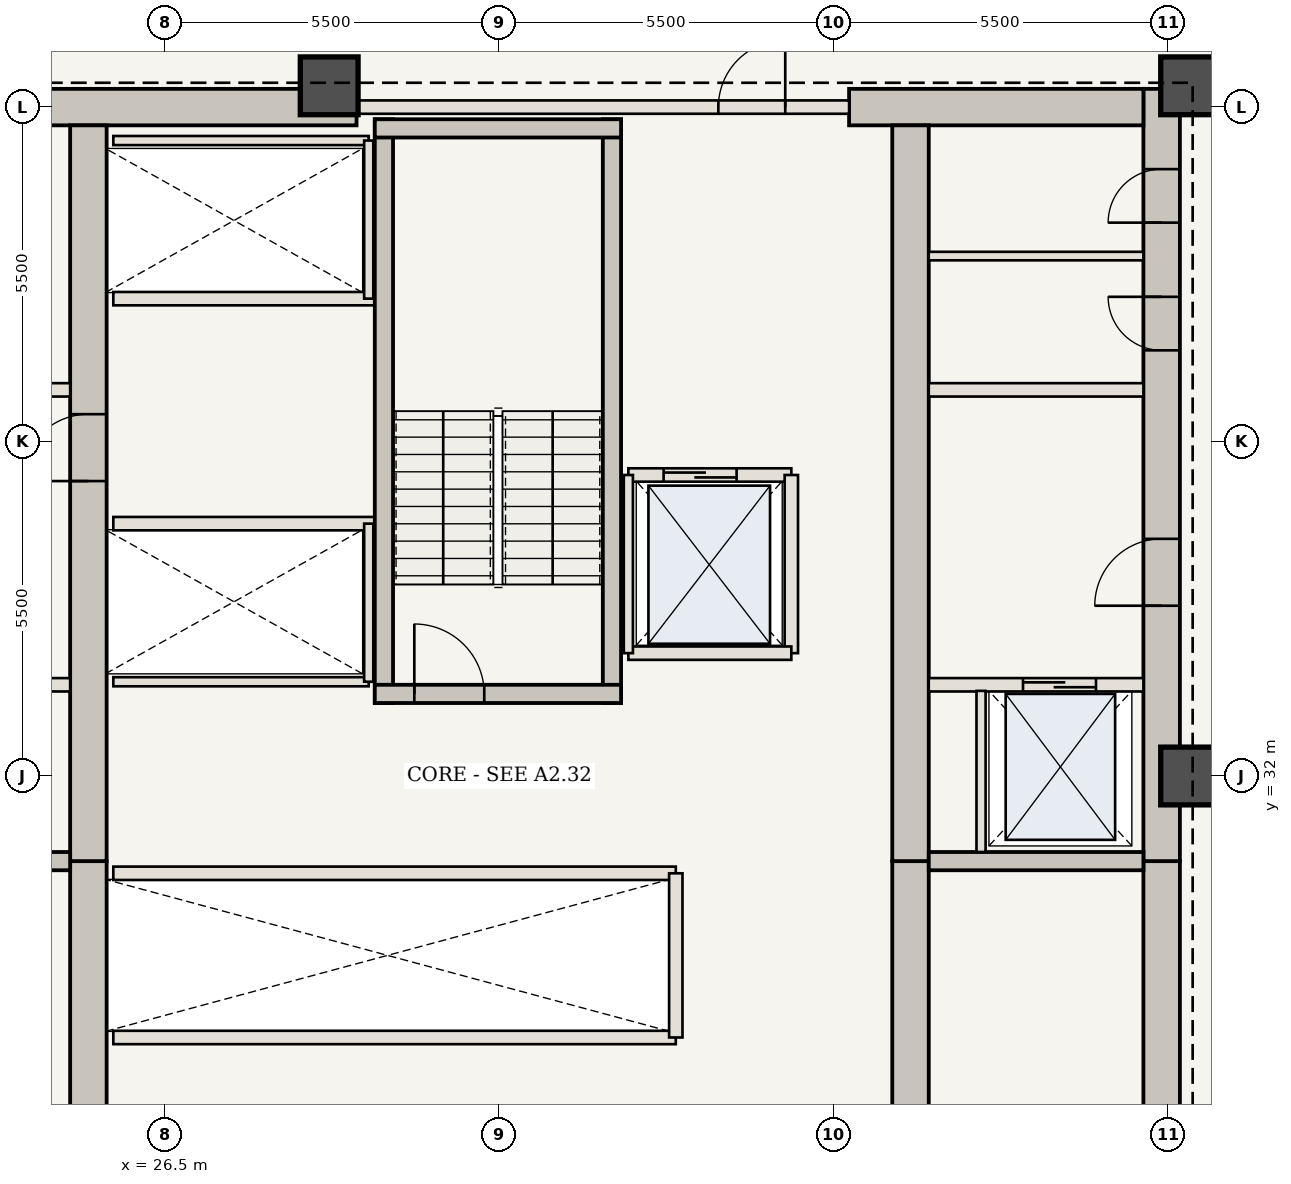
"""IFC4 building model, lengths in metres.
Left out: names, types, materials, properties, quantities, classifications, styles, units other than length and angle.
Written with IfcOpenShell. Run it as: python <this file> out.ifc"""

import sys

from ifc_helpers import new_model, si_unit, direction, frame, frame_2d, origin, origin_2d, place, context, subcontext, project, spatial, rectangle, extrude, element, fill, save


model = new_model("IFC4")
c1 = context("Model", 3, precision=1e-05, world=origin(), true_north=direction((0.0, 1.0)))
c2 = subcontext(c1, "Body", "Model", "MODEL_VIEW")
j1 = project(units=[si_unit("LENGTHUNIT", "METRE"), si_unit("PLANEANGLEUNIT", "RADIAN")], contexts=[c1])
p1 = place(None, origin())
s1 = spatial("IfcSite", under=j1, at=p1, CompositionType="ELEMENT")
p2 = place(p1, origin())
s2 = spatial("IfcBuilding", under=s1, at=p2, CompositionType="ELEMENT")
p3 = place(p2, frame((0.0, 0.0, 137.55)))
s3 = spatial("IfcBuildingStorey", under=s2, at=p3, CompositionType="ELEMENT", Elevation=137.55)
p4 = place(p3, frame((42.89, 20.65, 0.0), z_axis=(0.0, 0.0, 1.0), x_axis=(0.0, 1.0, 0.0)))
e1 = element("IfcWall", 1, at=p4, inside=s3, PredefinedType="SHEAR", context=c2, shape_type="SweptSolid", body=[
    extrude(rectangle(XDim=9.95, YDim=0.6, at=frame_2d((4.975, 0.0))), origin(), (0.0, 0.0, 1.0), 3.85),
])
p5 = place(p4, frame((1.1, 0.0, 0.0)))
e2 = element("IfcOpeningElement", 2, at=p5, cuts=e1, PredefinedType="OPENING", context=c2, shape_type="SweptSolid", body=[
    extrude(rectangle(XDim=1.15, YDim=2.15, at=frame_2d((0.575, 1.075))), frame((0.0, 0.31, 0.0), z_axis=(0.0, -1.0, 0.0), x_axis=(1.0, 0.0, 0.0)), (0.0, 0.0, 1.0), 0.62),
])
p6 = place(p3, frame((42.89, 30.6, 0.0), z_axis=(0.0, 0.0, 1.0), x_axis=(0.0, 1.0, 0.0)))
e3 = element("IfcWall", 3, at=p6, inside=s3, PredefinedType="SHEAR", context=c2, shape_type="SweptSolid", body=[
    extrude(rectangle(XDim=12.7, YDim=0.6, at=frame_2d((6.35, 0.0))), origin(), (0.0, 0.0, 1.0), 3.85),
])
p7 = place(p6, frame((4.2, 0.0, 0.0)))
e4 = element("IfcOpeningElement", 4, at=p7, cuts=e3, PredefinedType="OPENING", context=c2, shape_type="SweptSolid", body=[
    extrude(rectangle(XDim=1.1, YDim=2.15, at=frame_2d((0.55, 1.075))), frame((0.0, 0.31, 0.0), z_axis=(0.0, -1.0, 0.0), x_axis=(1.0, 0.0, 0.0)), (0.0, 0.0, 1.0), 0.62),
])
p8 = place(p6, frame((8.4, 0.0, 0.0)))
e5 = element("IfcOpeningElement", 5, at=p8, cuts=e3, PredefinedType="OPENING", context=c2, shape_type="SweptSolid", body=[
    extrude(rectangle(XDim=0.88, YDim=2.1, at=frame_2d((0.44, 1.05))), frame((0.0, 0.31, 0.0), z_axis=(0.0, -1.0, 0.0), x_axis=(1.0, 0.0, 0.0)), (0.0, 0.0, 1.0), 0.62),
])
p9 = place(p6, frame((10.5, 0.0, 0.0)))
e6 = element("IfcOpeningElement", 6, at=p9, cuts=e3, PredefinedType="OPENING", context=c2, shape_type="SweptSolid", body=[
    extrude(rectangle(XDim=0.88, YDim=2.1, at=frame_2d((0.44, 1.05))), frame((0.0, 0.31, 0.0), z_axis=(0.0, -1.0, 0.0), x_axis=(1.0, 0.0, 0.0)), (0.0, 0.0, 1.0), 0.62),
])
p10 = place(p3, frame((21.41, 43.0, 0.0), z_axis=(0.0, 0.0, 1.0), x_axis=(1.0, 0.0, 0.0)))
e7 = element("IfcWall", 7, at=p10, inside=s3, PredefinedType="SHEAR", context=c2, shape_type="SweptSolid", body=[
    extrude(rectangle(XDim=8.24, YDim=0.6, at=frame_2d((4.12, 0.0))), origin(), (0.0, 0.0, 1.0), 3.85),
])
p11 = place(p3, frame((37.75, 43.0, 0.0), z_axis=(0.0, 0.0, 1.0), x_axis=(1.0, 0.0, 0.0)))
e8 = element("IfcWall", 8, at=p11, inside=s3, PredefinedType="SHEAR", context=c2, shape_type="SweptSolid", body=[
    extrude(rectangle(XDim=4.84, YDim=0.6, at=frame_2d((2.42, 0.0))), origin(), (0.0, 0.0, 1.0), 3.85),
])
p12 = place(p3, frame((25.24, 21.25, 0.0), z_axis=(0.0, 0.0, 1.0), x_axis=(0.0, 1.0, 0.0)))
e9 = element("IfcWall", 9, at=p12, inside=s3, PredefinedType="SHEAR", context=c2, shape_type="SweptSolid", body=[
    extrude(rectangle(XDim=9.35, YDim=0.6, at=frame_2d((4.675, 0.0))), origin(), (0.0, 0.0, 1.0), 3.85),
])
p13 = place(p3, frame((25.24, 30.6, 0.0), z_axis=(0.0, 0.0, 1.0), x_axis=(0.0, 1.0, 0.0)))
e10 = element("IfcWall", 10, at=p13, inside=s3, PredefinedType="SHEAR", context=c2, shape_type="SweptSolid", body=[
    extrude(rectangle(XDim=12.1, YDim=0.6, at=frame_2d((6.05, 0.0))), origin(), (0.0, 0.0, 1.0), 3.85),
])
p14 = place(p13, frame((6.25, 0.0, 0.0)))
e11 = element("IfcOpeningElement", 11, at=p14, cuts=e10, PredefinedType="OPENING", context=c2, shape_type="SweptSolid", body=[
    extrude(rectangle(XDim=1.1, YDim=2.15, at=frame_2d((0.55, 1.075))), frame((0.0, 0.31, 0.0), z_axis=(0.0, -1.0, 0.0), x_axis=(1.0, 0.0, 0.0)), (0.0, 0.0, 1.0), 0.62),
])
p15 = place(p3, frame((38.76, 21.25, 0.0), z_axis=(0.0, 0.0, 1.0), x_axis=(0.0, 1.0, 0.0)))
e12 = element("IfcWall", 12, at=p15, inside=s3, PredefinedType="SHEAR", context=c2, shape_type="SweptSolid", body=[
    extrude(rectangle(XDim=9.35, YDim=0.6, at=frame_2d((4.675, 0.0))), origin(), (0.0, 0.0, 1.0), 3.85),
])
p16 = place(p3, frame((38.76, 30.6, 0.0), z_axis=(0.0, 0.0, 1.0), x_axis=(0.0, 1.0, 0.0)))
e13 = element("IfcWall", 13, at=p16, inside=s3, PredefinedType="SHEAR", context=c2, shape_type="SweptSolid", body=[
    extrude(rectangle(XDim=12.1, YDim=0.6, at=frame_2d((6.05, 0.0))), origin(), (0.0, 0.0, 1.0), 3.85),
])
for number, where, z_axis, x_axis in (
    (14, (43.35, 32.0, 0.0), (0.0, 0.0, 1.0), (1.0, 0.0, 0.0)),
    (15, (43.35, 43.35, 0.0), (0.0, 0.0, 1.0), (1.0, 0.0, 0.0)),
    (16, (29.2, 43.35, 0.0), (0.0, 0.0, 1.0), (1.0, 0.0, 0.0)),
):
    element("IfcColumn", number, at=place(p3, frame(where, z_axis=z_axis, x_axis=x_axis)), inside=s3, PredefinedType="COLUMN", context=c2, shape_type="SweptSolid", body=[
        extrude(rectangle(XDim=0.95, YDim=0.95, at=origin_2d()), origin(), (0.0, 0.0, 1.0), 3.85),
    ])
for number, where, z_axis, x_axis in (
    (17, (21.41, 30.6, 0.0), (0.0, 0.0, 1.0), (1.0, 0.0, 0.0)),
    (18, (39.06, 30.6, 0.0), (0.0, 0.0, 1.0), (1.0, 0.0, 0.0)),
):
    element("IfcWall", number, at=place(p3, frame(where, z_axis=z_axis, x_axis=x_axis)), inside=s3, PredefinedType="SHEAR", context=c2, shape_type="SweptSolid", body=[
        extrude(rectangle(XDim=3.53, YDim=0.3, at=frame_2d((1.765, 0.0))), origin(), (0.0, 0.0, 1.0), 3.685),
    ])
p17 = place(p3, frame((21.41, 33.5, 0.0), z_axis=(0.0, 0.0, 1.0), x_axis=(1.0, 0.0, 0.0)))
e19 = element("IfcWall", 19, at=p17, inside=s3, PredefinedType="STANDARD", context=c2, shape_type="SweptSolid", body=[
    extrude(rectangle(XDim=3.53, YDim=0.22, at=frame_2d((1.765, 0.0))), origin(), (0.0, 0.0, 1.0), 3.685),
])
p18 = place(p17, frame((0.75, 0.0, 0.0)))
e20 = element("IfcOpeningElement", 20, at=p18, cuts=e19, PredefinedType="OPENING", context=c2, shape_type="SweptSolid", body=[
    extrude(rectangle(XDim=1.2, YDim=2.2, at=frame_2d((0.6, 1.1))), frame((0.0, 0.12, 0.0), z_axis=(0.0, -1.0, 0.0), x_axis=(1.0, 0.0, 0.0)), (0.0, 0.0, 1.0), 0.24),
])
p19 = place(p3, frame((39.06, 33.5, 0.0), z_axis=(0.0, 0.0, 1.0), x_axis=(1.0, 0.0, 0.0)))
e21 = element("IfcWall", 21, at=p19, inside=s3, PredefinedType="STANDARD", context=c2, shape_type="SweptSolid", body=[
    extrude(rectangle(XDim=3.53, YDim=0.22, at=frame_2d((1.765, 0.0))), origin(), (0.0, 0.0, 1.0), 3.685),
])
p20 = place(p19, frame((1.55, 0.0, 0.0)))
e22 = element("IfcOpeningElement", 22, at=p20, cuts=e21, PredefinedType="OPENING", context=c2, shape_type="SweptSolid", body=[
    extrude(rectangle(XDim=1.2, YDim=2.2, at=frame_2d((0.6, 1.1))), frame((0.0, 0.12, 0.0), z_axis=(0.0, -1.0, 0.0), x_axis=(1.0, 0.0, 0.0)), (0.0, 0.0, 1.0), 0.24),
])
p21 = place(p3, frame((39.92, 30.75, 0.0), z_axis=(0.0, 0.0, 1.0), x_axis=(0.0, 1.0, 0.0)))
e23 = element("IfcWall", 23, at=p21, inside=s3, PredefinedType="STANDARD", context=c2, shape_type="SweptSolid", body=[
    extrude(rectangle(XDim=2.65, YDim=0.15, at=frame_2d((1.325, 0.0))), origin(), (0.0, 0.0, 1.0), 3.685),
])
for number, where, z_axis, x_axis in (
    (24, (21.41, 38.35, 0.0), (0.0, 0.0, 1.0), (1.0, 0.0, 0.0)),
    (25, (39.06, 38.35, 0.0), (0.0, 0.0, 1.0), (1.0, 0.0, 0.0)),
):
    element("IfcWall", number, at=place(p3, frame(where, z_axis=z_axis, x_axis=x_axis)), inside=s3, PredefinedType="STANDARD", context=c2, shape_type="SweptSolid", body=[
        extrude(rectangle(XDim=3.53, YDim=0.22, at=frame_2d((1.765, 0.0))), origin(), (0.0, 0.0, 1.0), 3.685),
    ])
p22 = place(p3, frame((39.06, 40.55, 0.0), z_axis=(0.0, 0.0, 1.0), x_axis=(1.0, 0.0, 0.0)))
e26 = element("IfcWall", 26, at=p22, inside=s3, PredefinedType="STANDARD", context=c2, shape_type="SweptSolid", body=[
    extrude(rectangle(XDim=3.53, YDim=0.14, at=frame_2d((1.765, 0.0))), origin(), (0.0, 0.0, 1.0), 3.685),
])
for number, where, z_axis, x_axis in (
    (27, (25.65, 27.7, 0.0), (0.0, 0.0, 1.0), (1.0, 0.0, 0.0)),
    (28, (25.65, 30.4, 0.0), (0.0, 0.0, 1.0), (1.0, 0.0, 0.0)),
):
    element("IfcWall", number, at=place(p3, frame(where, z_axis=z_axis, x_axis=x_axis)), inside=s3, PredefinedType="STANDARD", context=c2, shape_type="SweptSolid", body=[
        extrude(rectangle(XDim=9.25, YDim=0.22, at=frame_2d((4.625, 0.0))), origin(), (0.0, 0.0, 1.0), 3.685),
    ])
p23 = place(p3, frame((34.9, 27.7, 0.0), z_axis=(0.0, 0.0, 1.0), x_axis=(0.0, 1.0, 0.0)))
e29 = element("IfcWall", 29, at=p23, inside=s3, PredefinedType="STANDARD", context=c2, shape_type="SweptSolid", body=[
    extrude(rectangle(XDim=2.7, YDim=0.22, at=frame_2d((1.35, 0.0))), origin(), (0.0, 0.0, 1.0), 3.685),
])
p24 = place(p3, frame((25.65, 36.15, 0.0), z_axis=(0.0, 0.0, 1.0), x_axis=(1.0, 0.0, 0.0)))
e30 = element("IfcWall", 30, at=p24, inside=s3, PredefinedType="STANDARD", context=c2, shape_type="SweptSolid", body=[
    extrude(rectangle(XDim=4.3, YDim=0.22, at=frame_2d((2.15, 0.0))), origin(), (0.0, 0.0, 1.0), 3.685),
])
p25 = place(p3, frame((25.65, 33.55, 0.0), z_axis=(0.0, 0.0, 1.0), x_axis=(1.0, 0.0, 0.0)))
e31 = element("IfcWall", 31, at=p25, inside=s3, PredefinedType="STANDARD", context=c2, shape_type="SweptSolid", body=[
    extrude(rectangle(XDim=4.2, YDim=0.15, at=frame_2d((2.1, 0.0))), origin(), (0.0, 0.0, 1.0), 3.685),
])
p26 = place(p3, frame((29.85, 33.55, 0.0), z_axis=(0.0, 0.0, 1.0), x_axis=(0.0, 1.0, 0.0)))
e32 = element("IfcWall", 32, at=p26, inside=s3, PredefinedType="STANDARD", context=c2, shape_type="SweptSolid", body=[
    extrude(rectangle(XDim=2.6, YDim=0.15, at=frame_2d((1.3, 0.0))), origin(), (0.0, 0.0, 1.0), 3.685),
])
p27 = place(p3, frame((25.65, 39.85, 0.0), z_axis=(0.0, 0.0, 1.0), x_axis=(1.0, 0.0, 0.0)))
e33 = element("IfcWall", 33, at=p27, inside=s3, PredefinedType="STANDARD", context=c2, shape_type="SweptSolid", body=[
    extrude(rectangle(XDim=4.3, YDim=0.22, at=frame_2d((2.15, 0.0))), origin(), (0.0, 0.0, 1.0), 3.685),
])
p28 = place(p3, frame((25.65, 42.45, 0.0), z_axis=(0.0, 0.0, 1.0), x_axis=(1.0, 0.0, 0.0)))
e34 = element("IfcWall", 34, at=p28, inside=s3, PredefinedType="STANDARD", context=c2, shape_type="SweptSolid", body=[
    extrude(rectangle(XDim=4.2, YDim=0.15, at=frame_2d((2.1, 0.0))), origin(), (0.0, 0.0, 1.0), 3.685),
])
p29 = place(p3, frame((29.85, 39.85, 0.0), z_axis=(0.0, 0.0, 1.0), x_axis=(0.0, 1.0, 0.0)))
e35 = element("IfcWall", 35, at=p29, inside=s3, PredefinedType="STANDARD", context=c2, shape_type="SweptSolid", body=[
    extrude(rectangle(XDim=2.6, YDim=0.15, at=frame_2d((1.3, 0.0))), origin(), (0.0, 0.0, 1.0), 3.685),
])
for number, where, z_axis, x_axis in (
    (36, (30.1, 33.2, 0.0), (0.0, 0.0, 1.0), (0.0, 1.0, 0.0)),
    (37, (33.85, 33.2, 0.0), (0.0, 0.0, 1.0), (0.0, 1.0, 0.0)),
):
    element("IfcWall", number, at=place(p3, frame(where, z_axis=z_axis, x_axis=x_axis)), inside=s3, PredefinedType="SHEAR", context=c2, shape_type="SweptSolid", body=[
        extrude(rectangle(XDim=9.6, YDim=0.3, at=frame_2d((4.8, 0.0))), origin(), (0.0, 0.0, 1.0), 3.685),
    ])
p30 = place(p3, frame((29.95, 33.35, 0.0), z_axis=(0.0, 0.0, 1.0), x_axis=(1.0, 0.0, 0.0)))
e38 = element("IfcWall", 38, at=p30, inside=s3, PredefinedType="SHEAR", context=c2, shape_type="SweptSolid", body=[
    extrude(rectangle(XDim=4.05, YDim=0.3, at=frame_2d((2.025, 0.0))), origin(), (0.0, 0.0, 1.0), 3.685),
])
p31 = place(p30, frame((0.65, 0.0, 0.0)))
e39 = element("IfcOpeningElement", 39, at=p31, cuts=e38, PredefinedType="OPENING", context=c2, shape_type="SweptSolid", body=[
    extrude(rectangle(XDim=1.15, YDim=2.15, at=frame_2d((0.575, 1.075))), frame((0.0, 0.16, 0.0), z_axis=(0.0, -1.0, 0.0), x_axis=(1.0, 0.0, 0.0)), (0.0, 0.0, 1.0), 0.32),
])
p32 = place(p3, frame((29.95, 42.65, 0.0), z_axis=(0.0, 0.0, 1.0), x_axis=(1.0, 0.0, 0.0)))
e40 = element("IfcWall", 40, at=p32, inside=s3, PredefinedType="SHEAR", context=c2, shape_type="SweptSolid", body=[
    extrude(rectangle(XDim=4.05, YDim=0.3, at=frame_2d((2.025, 0.0))), origin(), (0.0, 0.0, 1.0), 3.685),
])
p33 = place(p3, frame((29.65, 43.0, 0.0), z_axis=(0.0, 0.0, 1.0), x_axis=(1.0, 0.0, 0.0)))
e41 = element("IfcWall", 41, at=p33, inside=s3, PredefinedType="STANDARD", context=c2, shape_type="SweptSolid", body=[
    extrude(rectangle(XDim=8.1, YDim=0.22, at=frame_2d((4.05, 0.0))), origin(), (0.0, 0.0, 1.0), 3.685),
])
p34 = place(p33, frame((5.95, 0.0, 0.0)))
e42 = element("IfcOpeningElement", 42, at=p34, cuts=e41, PredefinedType="OPENING", context=c2, shape_type="SweptSolid", body=[
    extrude(rectangle(XDim=1.1, YDim=2.15, at=frame_2d((0.55, 1.075))), frame((0.0, 0.12, 0.0), z_axis=(0.0, -1.0, 0.0), x_axis=(1.0, 0.0, 0.0)), (0.0, 0.0, 1.0), 0.24),
])
p35 = place(p3, frame((34.12, 36.95, 0.0), z_axis=(0.0, 0.0, 1.0), x_axis=(1.0, 0.0, 0.0)))
e43 = element("IfcWall", 43, at=p35, inside=s3, PredefinedType="STANDARD", context=c2, shape_type="SweptSolid", body=[
    extrude(rectangle(XDim=2.68, YDim=0.22, at=frame_2d((1.34, 0.0))), origin(), (0.0, 0.0, 1.0), 3.685),
])
p36 = place(p35, frame((0.58, 0.0, 0.0)))
e44 = element("IfcOpeningElement", 44, at=p36, cuts=e43, PredefinedType="OPENING", context=c2, shape_type="SweptSolid", body=[
    extrude(rectangle(XDim=1.2, YDim=2.2, at=frame_2d((0.6, 1.1))), frame((0.0, 0.12, 0.0), z_axis=(0.0, -1.0, 0.0), x_axis=(1.0, 0.0, 0.0)), (0.0, 0.0, 1.0), 0.24),
])
p37 = place(p3, frame((36.8, 34.02, 0.0), z_axis=(0.0, 0.0, 1.0), x_axis=(0.0, 1.0, 0.0)))
e45 = element("IfcWall", 45, at=p37, inside=s3, PredefinedType="STANDARD", context=c2, shape_type="SweptSolid", body=[
    extrude(rectangle(XDim=2.93, YDim=0.22, at=frame_2d((1.465, 0.0))), origin(), (0.0, 0.0, 1.0), 3.685),
])
p38 = place(p3, frame((34.12, 34.02, 0.0), z_axis=(0.0, 0.0, 1.0), x_axis=(1.0, 0.0, 0.0)))
e46 = element("IfcWall", 46, at=p38, inside=s3, PredefinedType="STANDARD", context=c2, shape_type="SweptSolid", body=[
    extrude(rectangle(XDim=2.68, YDim=0.22, at=frame_2d((1.34, 0.0))), origin(), (0.0, 0.0, 1.0), 3.685),
])
p39 = place(p3, frame((34.12, 34.02, 0.0), z_axis=(0.0, 0.0, 1.0), x_axis=(0.0, 1.0, 0.0)))
e47 = element("IfcWall", 47, at=p39, inside=s3, PredefinedType="STANDARD", context=c2, shape_type="SweptSolid", body=[
    extrude(rectangle(XDim=2.93, YDim=0.15, at=frame_2d((1.465, 0.0))), origin(), (0.0, 0.0, 1.0), 3.685),
])
p40 = place(p7, origin())
e48 = element("IfcDoor", 48, at=p40, inside=s3, OperationType="SINGLE_SWING_LEFT", PredefinedType="DOOR", context=c2, shape_type="SweptSolid", body=[
    extrude(rectangle(XDim=1.1, YDim=2.15, at=frame_2d((0.55, 1.075))), frame((0.0, 0.025, 0.0), z_axis=(0.0, -1.0, 0.0), x_axis=(1.0, 0.0, 0.0)), (0.0, 0.0, 1.0), 0.05),
])
fill(e4, e48)
p41 = place(p14, origin())
e49 = element("IfcDoor", 49, at=p41, inside=s3, OperationType="SINGLE_SWING_LEFT", PredefinedType="DOOR", context=c2, shape_type="SweptSolid", body=[
    extrude(rectangle(XDim=1.1, YDim=2.15, at=frame_2d((0.55, 1.075))), frame((0.0, 0.025, 0.0), z_axis=(0.0, -1.0, 0.0), x_axis=(1.0, 0.0, 0.0)), (0.0, 0.0, 1.0), 0.05),
])
fill(e11, e49)
p42 = place(p8, origin())
e50 = element("IfcDoor", 50, at=p42, inside=s3, OperationType="SINGLE_SWING_RIGHT", PredefinedType="DOOR", context=c2, shape_type="SweptSolid", body=[
    extrude(rectangle(XDim=0.88, YDim=2.1, at=frame_2d((0.44, 1.05))), frame((0.0, 0.025, 0.0), z_axis=(0.0, -1.0, 0.0), x_axis=(1.0, 0.0, 0.0)), (0.0, 0.0, 1.0), 0.05),
])
fill(e5, e50)
p43 = place(p9, origin())
e51 = element("IfcDoor", 51, at=p43, inside=s3, OperationType="SINGLE_SWING_LEFT", PredefinedType="DOOR", context=c2, shape_type="SweptSolid", body=[
    extrude(rectangle(XDim=0.88, YDim=2.1, at=frame_2d((0.44, 1.05))), frame((0.0, 0.025, 0.0), z_axis=(0.0, -1.0, 0.0), x_axis=(1.0, 0.0, 0.0)), (0.0, 0.0, 1.0), 0.05),
])
fill(e6, e51)
p44 = place(p20, origin())
e52 = element("IfcDoor", 52, at=p44, inside=s3, OperationType="DOUBLE_DOOR_SLIDING", PredefinedType="DOOR", context=c2, shape_type="SweptSolid", body=[
    extrude(rectangle(XDim=1.2, YDim=2.2, at=frame_2d((0.6, 1.1))), frame((0.0, 0.025, 0.0), z_axis=(0.0, -1.0, 0.0), x_axis=(1.0, 0.0, 0.0)), (0.0, 0.0, 1.0), 0.05),
])
fill(e22, e52)
p45 = place(p31, origin())
e53 = element("IfcDoor", 53, at=p45, inside=s3, OperationType="SINGLE_SWING_LEFT", PredefinedType="DOOR", context=c2, shape_type="SweptSolid", body=[
    extrude(rectangle(XDim=1.15, YDim=2.15, at=frame_2d((0.575, 1.075))), frame((0.0, 0.025, 0.0), z_axis=(0.0, -1.0, 0.0), x_axis=(1.0, 0.0, 0.0)), (0.0, 0.0, 1.0), 0.05),
])
fill(e39, e53)
p46 = place(p34, origin())
e54 = element("IfcDoor", 54, at=p46, inside=s3, OperationType="SINGLE_SWING_RIGHT", PredefinedType="DOOR", context=c2, shape_type="SweptSolid", body=[
    extrude(rectangle(XDim=1.1, YDim=2.15, at=frame_2d((0.55, 1.075))), frame((0.0, 0.025, 0.0), z_axis=(0.0, -1.0, 0.0), x_axis=(1.0, 0.0, 0.0)), (0.0, 0.0, 1.0), 0.05),
])
fill(e42, e54)
p47 = place(p36, origin())
e55 = element("IfcDoor", 55, at=p47, inside=s3, OperationType="DOUBLE_DOOR_SLIDING", PredefinedType="DOOR", context=c2, shape_type="SweptSolid", body=[
    extrude(rectangle(XDim=1.2, YDim=2.2, at=frame_2d((0.6, 1.1))), frame((0.0, 0.025, 0.0), z_axis=(0.0, -1.0, 0.0), x_axis=(1.0, 0.0, 0.0)), (0.0, 0.0, 1.0), 0.05),
])
fill(e44, e55)
save(model, sys.argv[1])
